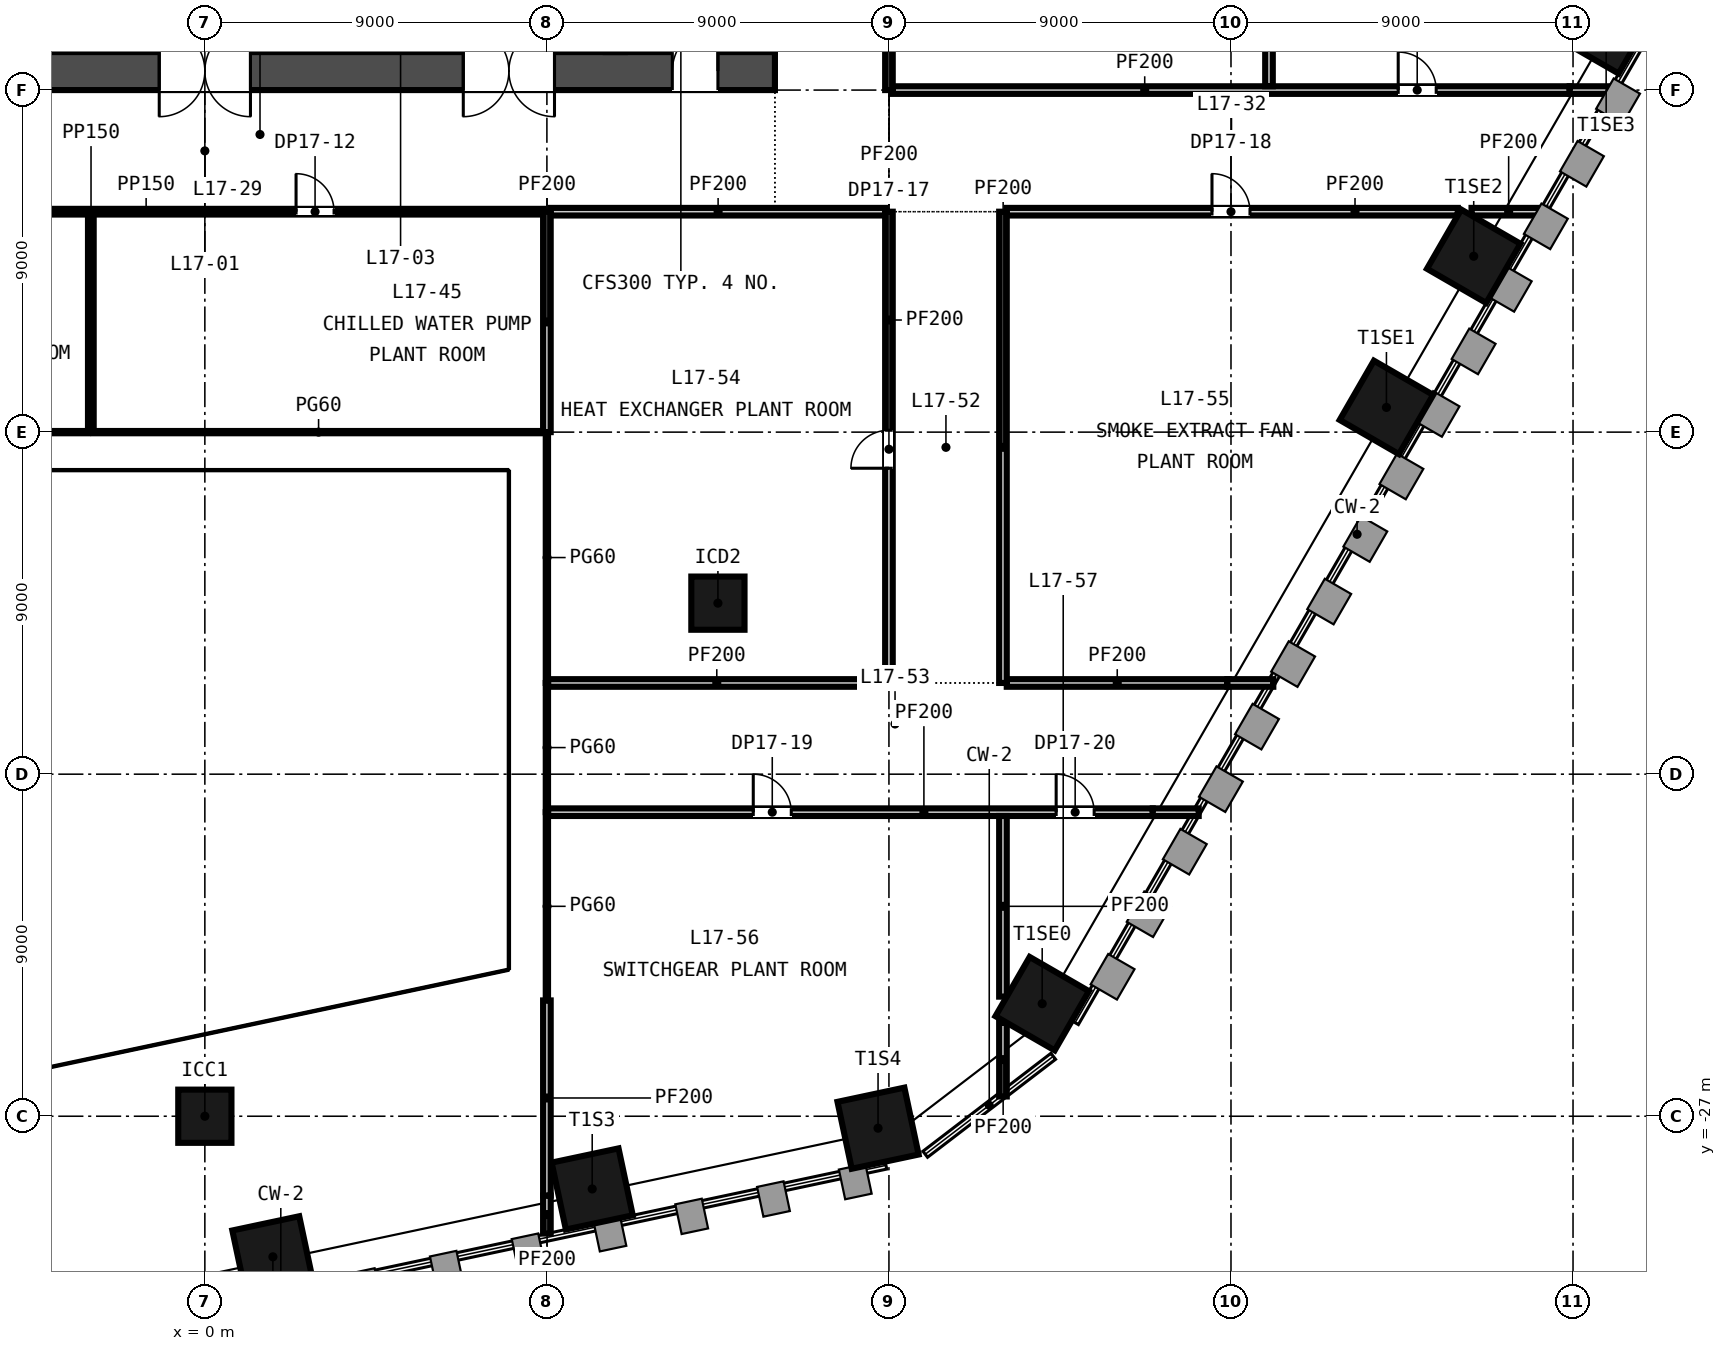
"""IFC4 building model, lengths in metres.
Left out: names, types, materials, properties, quantities, classifications, styles, units other than length and angle.
Written with IfcOpenShell. Run it as: python <this file> out.ifc"""

import sys

from ifc_helpers import new_model, si_unit, direction, frame, frame_2d, origin, origin_2d, place, context, subcontext, project, spatial, rectangle, extrude, element, fill, save


model = new_model("IFC4")
c1 = context("Model", 3, precision=1e-05, world=origin(), true_north=direction((0.0, 1.0)))
c2 = subcontext(c1, "Body", "Model", "MODEL_VIEW")
j1 = project(units=[si_unit("LENGTHUNIT", "METRE"), si_unit("PLANEANGLEUNIT", "RADIAN")], contexts=[c1])
p1 = place(None, origin())
s1 = spatial("IfcSite", under=j1, at=p1, CompositionType="ELEMENT")
p2 = place(p1, origin())
s2 = spatial("IfcBuilding", under=s1, at=p2, CompositionType="ELEMENT")
p3 = place(p2, frame((0.0, 0.0, 76.15)))
s3 = spatial("IfcBuildingStorey", under=s2, at=p3, CompositionType="ELEMENT", Elevation=76.15)
p4 = place(p3, frame((-15.0, 0.5, -0.3), z_axis=(0.0, 0.0, 1.0), x_axis=(1.0, 0.0, 0.0)))
e1 = element("IfcWall", 1, at=p4, inside=s3, PredefinedType="SOLIDWALL", context=c2, shape_type="SweptSolid", body=[
    extrude(rectangle(XDim=30.0, YDim=1.0, at=frame_2d((15.0, 0.0))), origin(), (0.0, 0.0, 1.0), 4.65),
])
p5 = place(p4, frame((5.8, 0.0, 0.3)))
e2 = element("IfcOpeningElement", 2, at=p5, cuts=e1, PredefinedType="OPENING", context=c2, shape_type="SweptSolid", body=[
    extrude(rectangle(XDim=2.4, YDim=2.4, at=frame_2d((1.2, 1.2))), frame((0.0, 0.51, 0.0), z_axis=(0.0, -1.0, 0.0), x_axis=(1.0, 0.0, 0.0)), (0.0, 0.0, 1.0), 1.02),
])
p6 = place(p4, frame((13.8, 0.0, 0.3)))
e3 = element("IfcOpeningElement", 3, at=p6, cuts=e1, PredefinedType="OPENING", context=c2, shape_type="SweptSolid", body=[
    extrude(rectangle(XDim=2.4, YDim=2.4, at=frame_2d((1.2, 1.2))), frame((0.0, 0.51, 0.0), z_axis=(0.0, -1.0, 0.0), x_axis=(1.0, 0.0, 0.0)), (0.0, 0.0, 1.0), 1.02),
])
p7 = place(p4, frame((21.8, 0.0, 0.3)))
e4 = element("IfcOpeningElement", 4, at=p7, cuts=e1, PredefinedType="OPENING", context=c2, shape_type="SweptSolid", body=[
    extrude(rectangle(XDim=2.4, YDim=2.4, at=frame_2d((1.2, 1.2))), frame((0.0, 0.51, 0.0), z_axis=(0.0, -1.0, 0.0), x_axis=(1.0, 0.0, 0.0)), (0.0, 0.0, 1.0), 1.02),
])
p8 = place(p4, frame((1.5, 0.0, 0.3)))
e5 = element("IfcOpeningElement", 5, at=p8, cuts=e1, PredefinedType="OPENING", context=c2, shape_type="SweptSolid", body=[
    extrude(rectangle(XDim=1.2, YDim=2.1, at=frame_2d((0.6, 1.05))), frame((0.0, 0.51, 0.0), z_axis=(0.0, -1.0, 0.0), x_axis=(1.0, 0.0, 0.0)), (0.0, 0.0, 1.0), 1.02),
])
p9 = place(p4, frame((27.3, 0.0, 0.3)))
e6 = element("IfcOpeningElement", 6, at=p9, cuts=e1, PredefinedType="OPENING", context=c2, shape_type="SweptSolid", body=[
    extrude(rectangle(XDim=1.2, YDim=2.1, at=frame_2d((0.6, 1.05))), frame((0.0, 0.51, 0.0), z_axis=(0.0, -1.0, 0.0), x_axis=(1.0, 0.0, 0.0)), (0.0, 0.0, 1.0), 1.02),
])
for number, where, z_axis, x_axis in (
    (7, (1.791, -30.699, -0.3), (0.0, 0.0, 1.0), (0.978, 0.208, 0.0)),
    (8, (10.192, -28.914, -0.3), (0.0, 0.0, 1.0), (0.978, 0.208, 0.0)),
    (9, (17.714, -27.315, -0.3), (0.0, 0.0, 1.0), (0.978, 0.208, 0.0)),
    (10, (22.032, -24.039, -0.3), (0.0, 0.0, 1.0), (0.5, 0.866, 0.0)),
    (11, (31.09, -8.35, -0.3), (0.0, 0.0, 1.0), (0.5, 0.866, 0.0)),
    (12, (33.387, -4.373, -0.3), (0.0, 0.0, 1.0), (0.5, 0.866, 0.0)),
    (13, (36.872, 1.663, -0.3), (0.0, 0.0, 1.0), (0.5, 0.866, 0.0)),
):
    element("IfcColumn", number, at=place(p3, frame(where, z_axis=z_axis, x_axis=x_axis)), inside=s3, PredefinedType="COLUMN", context=c2, shape_type="SweptSolid", body=[
        extrude(rectangle(XDim=1.8, YDim=1.8, at=origin_2d()), origin(), (0.0, 0.0, 1.0), 4.65),
    ])
for number, where, z_axis, x_axis in (
    (14, (0.0, -27.0, -0.3), (0.0, 0.0, 1.0), (1.0, 0.0, 0.0)),
    (15, (13.5, -13.5, -0.3), (0.0, 0.0, 1.0), (1.0, 0.0, 0.0)),
):
    element("IfcColumn", number, at=place(p3, frame(where, z_axis=z_axis, x_axis=x_axis)), inside=s3, PredefinedType="COLUMN", context=c2, shape_type="SweptSolid", body=[
        extrude(rectangle(XDim=1.4, YDim=1.4, at=origin_2d()), origin(), (0.0, 0.0, 1.0), 4.65),
    ])
p10 = place(p3, frame((9.03, -19.0, 0.0), z_axis=(0.0, 0.0, 1.0), x_axis=(1.0, 0.0, 0.0)))
e16 = element("IfcWall", 16, at=p10, inside=s3, PredefinedType="PARTITIONING", context=c2, shape_type="SweptSolid", body=[
    extrude(rectangle(XDim=15.911, YDim=0.2, at=frame_2d((7.956, 0.0))), origin(), (0.0, 0.0, 1.0), 4.35),
])
p11 = place(p10, frame((5.4, 0.0, 0.0)))
e17 = element("IfcOpeningElement", 17, at=p11, cuts=e16, PredefinedType="OPENING", context=c2, shape_type="SweptSolid", body=[
    extrude(rectangle(XDim=1.0, YDim=2.1, at=frame_2d((0.5, 1.05))), frame((0.0, 0.11, 0.0), z_axis=(0.0, -1.0, 0.0), x_axis=(1.0, 0.0, 0.0)), (0.0, 0.0, 1.0), 0.22),
])
p12 = place(p10, frame((13.37, 0.0, 0.0)))
e18 = element("IfcOpeningElement", 18, at=p12, cuts=e16, PredefinedType="OPENING", context=c2, shape_type="SweptSolid", body=[
    extrude(rectangle(XDim=1.0, YDim=2.1, at=frame_2d((0.5, 1.05))), frame((0.0, 0.11, 0.0), z_axis=(0.0, -1.0, 0.0), x_axis=(1.0, 0.0, 0.0)), (0.0, 0.0, 1.0), 0.22),
])
p13 = place(p3, frame((24.941, -19.0, 0.0), z_axis=(0.0, 0.0, 1.0), x_axis=(1.0, 0.0, 0.0)))
e19 = element("IfcWall", 19, at=p13, inside=s3, PredefinedType="PARTITIONING", context=c2, shape_type="SweptSolid", body=[
    extrude(rectangle(XDim=1.209, YDim=0.2, at=frame_2d((0.605, 0.0))), origin(), (0.0, 0.0, 1.0), 3.5),
])
p14 = place(p3, frame((9.03, -15.6, 0.0), z_axis=(0.0, 0.0, 1.0), x_axis=(1.0, 0.0, 0.0)))
e20 = element("IfcWall", 20, at=p14, inside=s3, PredefinedType="PARTITIONING", context=c2, shape_type="SweptSolid", body=[
    extrude(rectangle(XDim=8.87, YDim=0.2, at=frame_2d((4.435, 0.0))), origin(), (0.0, 0.0, 1.0), 4.35),
])
p15 = place(p3, frame((21.1, -15.6, 0.0), z_axis=(0.0, 0.0, 1.0), x_axis=(1.0, 0.0, 0.0)))
e21 = element("IfcWall", 21, at=p15, inside=s3, PredefinedType="PARTITIONING", context=c2, shape_type="SweptSolid", body=[
    extrude(rectangle(XDim=5.804, YDim=0.2, at=frame_2d((2.902, 0.0))), origin(), (0.0, 0.0, 1.0), 4.35),
])
p16 = place(p3, frame((26.905, -15.6, 0.0), z_axis=(0.0, 0.0, 1.0), x_axis=(1.0, 0.0, 0.0)))
e22 = element("IfcWall", 22, at=p16, inside=s3, PredefinedType="PARTITIONING", context=c2, shape_type="SweptSolid", body=[
    extrude(rectangle(XDim=1.209, YDim=0.2, at=frame_2d((0.604, 0.0))), origin(), (0.0, 0.0, 1.0), 3.5),
])
p17 = place(p3, frame((-8.9, -9.0, 0.0), z_axis=(0.0, 0.0, 1.0), x_axis=(1.0, 0.0, 0.0)))
e23 = element("IfcWall", 23, at=p17, inside=s3, PredefinedType="PARTITIONING", context=c2, shape_type="SweptSolid", body=[
    extrude(rectangle(XDim=5.825, YDim=0.06, at=frame_2d((2.913, 0.0))), origin(), (0.0, 0.0, 1.0), 4.35),
])
p18 = place(p3, frame((-2.925, -9.0, 0.0), z_axis=(0.0, 0.0, 1.0), x_axis=(1.0, 0.0, 0.0)))
e24 = element("IfcWall", 24, at=p18, inside=s3, PredefinedType="PARTITIONING", context=c2, shape_type="SweptSolid", body=[
    extrude(rectangle(XDim=11.825, YDim=0.06, at=frame_2d((5.913, 0.0))), origin(), (0.0, 0.0, 1.0), 4.35),
])
p19 = place(p3, frame((-8.9, -3.2, 0.0), z_axis=(0.0, 0.0, 1.0), x_axis=(1.0, 0.0, 0.0)))
e25 = element("IfcWall", 25, at=p19, inside=s3, PredefinedType="PARTITIONING", context=c2, shape_type="SweptSolid", body=[
    extrude(rectangle(XDim=17.8, YDim=0.15, at=frame_2d((8.9, 0.0))), origin(), (0.0, 0.0, 1.0), 4.35),
])
p20 = place(p19, frame((2.4, 0.0, 0.0)))
e26 = element("IfcOpeningElement", 26, at=p20, cuts=e25, PredefinedType="OPENING", context=c2, shape_type="SweptSolid", body=[
    extrude(rectangle(XDim=1.0, YDim=2.1, at=frame_2d((0.5, 1.05))), frame((0.0, 0.085, 0.0), z_axis=(0.0, -1.0, 0.0), x_axis=(1.0, 0.0, 0.0)), (0.0, 0.0, 1.0), 0.17),
])
p21 = place(p19, frame((11.3, 0.0, 0.0)))
e27 = element("IfcOpeningElement", 27, at=p21, cuts=e25, PredefinedType="OPENING", context=c2, shape_type="SweptSolid", body=[
    extrude(rectangle(XDim=1.0, YDim=2.1, at=frame_2d((0.5, 1.05))), frame((0.0, 0.085, 0.0), z_axis=(0.0, -1.0, 0.0), x_axis=(1.0, 0.0, 0.0)), (0.0, 0.0, 1.0), 0.17),
])
p22 = place(p3, frame((9.1, -3.2, 0.0), z_axis=(0.0, 0.0, 1.0), x_axis=(1.0, 0.0, 0.0)))
e28 = element("IfcWall", 28, at=p22, inside=s3, PredefinedType="PARTITIONING", context=c2, shape_type="SweptSolid", body=[
    extrude(rectangle(XDim=8.8, YDim=0.2, at=frame_2d((4.4, 0.0))), origin(), (0.0, 0.0, 1.0), 4.35),
])
p23 = place(p3, frame((21.1, -3.2, 0.0), z_axis=(0.0, 0.0, 1.0), x_axis=(1.0, 0.0, 0.0)))
e29 = element("IfcWall", 29, at=p23, inside=s3, PredefinedType="PARTITIONING", context=c2, shape_type="SweptSolid", body=[
    extrude(rectangle(XDim=11.867, YDim=0.2, at=frame_2d((5.933, 0.0))), origin(), (0.0, 0.0, 1.0), 4.35),
])
p24 = place(p23, frame((5.4, 0.0, 0.0)))
e30 = element("IfcOpeningElement", 30, at=p24, cuts=e29, PredefinedType="OPENING", context=c2, shape_type="SweptSolid", body=[
    extrude(rectangle(XDim=1.0, YDim=2.1, at=frame_2d((0.5, 1.05))), frame((0.0, 0.11, 0.0), z_axis=(0.0, -1.0, 0.0), x_axis=(1.0, 0.0, 0.0)), (0.0, 0.0, 1.0), 0.22),
])
p25 = place(p3, frame((33.329, -3.2, 0.0), z_axis=(0.0, 0.0, 1.0), x_axis=(1.0, 0.0, 0.0)))
e31 = element("IfcWall", 31, at=p25, inside=s3, PredefinedType="PARTITIONING", context=c2, shape_type="SweptSolid", body=[
    extrude(rectangle(XDim=1.944, YDim=0.2, at=frame_2d((0.972, 0.0))), origin(), (0.0, 0.0, 1.0), 3.5),
])
p26 = place(p3, frame((18.1, 0.0, 0.0), z_axis=(0.0, 0.0, 1.0), x_axis=(1.0, 0.0, 0.0)))
e32 = element("IfcWall", 32, at=p26, inside=s3, PredefinedType="PARTITIONING", context=c2, shape_type="SweptSolid", body=[
    extrude(rectangle(XDim=17.811, YDim=0.2, at=frame_2d((8.906, 0.0))), origin(), (0.0, 0.0, 1.0), 4.35),
])
p27 = place(p26, frame((13.3, 0.0, 0.0)))
e33 = element("IfcOpeningElement", 33, at=p27, cuts=e32, PredefinedType="OPENING", context=c2, shape_type="SweptSolid", body=[
    extrude(rectangle(XDim=1.0, YDim=2.1, at=frame_2d((0.5, 1.05))), frame((0.0, 0.11, 0.0), z_axis=(0.0, -1.0, 0.0), x_axis=(1.0, 0.0, 0.0)), (0.0, 0.0, 1.0), 0.22),
])
p28 = place(p3, frame((35.911, 0.0, 0.0), z_axis=(0.0, 0.0, 1.0), x_axis=(1.0, 0.0, 0.0)))
e34 = element("IfcWall", 34, at=p28, inside=s3, PredefinedType="PARTITIONING", context=c2, shape_type="SweptSolid", body=[
    extrude(rectangle(XDim=1.209, YDim=0.2, at=frame_2d((0.604, 0.0))), origin(), (0.0, 0.0, 1.0), 3.5),
])
p29 = place(p3, frame((-3.0, -9.0, 0.0), z_axis=(0.0, 0.0, 1.0), x_axis=(0.0, 1.0, 0.0)))
e35 = element("IfcWall", 35, at=p29, inside=s3, PredefinedType="PARTITIONING", context=c2, shape_type="SweptSolid", body=[
    extrude(rectangle(XDim=5.725, YDim=0.15, at=frame_2d((2.863, 0.0))), origin(), (0.0, 0.0, 1.0), 4.35),
])
p30 = place(p3, frame((9.0, -30.087, 0.0), z_axis=(0.0, 0.0, 1.0), x_axis=(0.0, 1.0, 0.0)))
e36 = element("IfcWall", 36, at=p30, inside=s3, PredefinedType="PARTITIONING", context=c2, shape_type="SweptSolid", body=[
    extrude(rectangle(XDim=1.0, YDim=0.2, at=frame_2d((0.5, 0.0))), origin(), (0.0, 0.0, 1.0), 3.5),
])
p31 = place(p3, frame((9.0, -29.087, 0.0), z_axis=(0.0, 0.0, 1.0), x_axis=(0.0, 1.0, 0.0)))
e37 = element("IfcWall", 37, at=p31, inside=s3, PredefinedType="PARTITIONING", context=c2, shape_type="SweptSolid", body=[
    extrude(rectangle(XDim=5.134, YDim=0.2, at=frame_2d((2.567, 0.0))), origin(), (0.0, 0.0, 1.0), 4.35),
])
p32 = place(p3, frame((9.0, -23.953, 0.0), z_axis=(0.0, 0.0, 1.0), x_axis=(0.0, 1.0, 0.0)))
e38 = element("IfcWall", 38, at=p32, inside=s3, PredefinedType="PARTITIONING", context=c2, shape_type="SweptSolid", body=[
    extrude(rectangle(XDim=4.952, YDim=0.06, at=frame_2d((2.476, 0.0))), origin(), (0.0, 0.0, 1.0), 4.35),
])
p33 = place(p3, frame((9.0, -18.999, 0.0), z_axis=(0.0, 0.0, 1.0), x_axis=(0.0, 1.0, 0.0)))
e39 = element("IfcWall", 39, at=p33, inside=s3, PredefinedType="PARTITIONING", context=c2, shape_type="SweptSolid", body=[
    extrude(rectangle(XDim=3.398, YDim=0.06, at=frame_2d((1.699, 0.0))), origin(), (0.0, 0.0, 1.0), 4.35),
])
p34 = place(p3, frame((9.0, -15.599, 0.0), z_axis=(0.0, 0.0, 1.0), x_axis=(0.0, 1.0, 0.0)))
e40 = element("IfcWall", 40, at=p34, inside=s3, PredefinedType="PARTITIONING", context=c2, shape_type="SweptSolid", body=[
    extrude(rectangle(XDim=6.598, YDim=0.06, at=frame_2d((3.299, 0.0))), origin(), (0.0, 0.0, 1.0), 4.35),
])
p35 = place(p3, frame((9.0, -9.0, 0.0), z_axis=(0.0, 0.0, 1.0), x_axis=(0.0, 1.0, 0.0)))
e41 = element("IfcWall", 41, at=p35, inside=s3, PredefinedType="PARTITIONING", context=c2, shape_type="SweptSolid", body=[
    extrude(rectangle(XDim=5.8, YDim=0.2, at=frame_2d((2.9, 0.0))), origin(), (0.0, 0.0, 1.0), 4.35),
])
p36 = place(p3, frame((18.0, -15.6, 0.0), z_axis=(0.0, 0.0, 1.0), x_axis=(0.0, 1.0, 0.0)))
e42 = element("IfcWall", 42, at=p36, inside=s3, PredefinedType="PARTITIONING", context=c2, shape_type="SweptSolid", body=[
    extrude(rectangle(XDim=12.4, YDim=0.2, at=frame_2d((6.2, 0.0))), origin(), (0.0, 0.0, 1.0), 4.35),
])
p37 = place(p36, frame((5.65, 0.0, 0.0)))
e43 = element("IfcOpeningElement", 43, at=p37, cuts=e42, PredefinedType="OPENING", context=c2, shape_type="SweptSolid", body=[
    extrude(rectangle(XDim=1.0, YDim=2.1, at=frame_2d((0.5, 1.05))), frame((0.0, 0.11, 0.0), z_axis=(0.0, -1.0, 0.0), x_axis=(1.0, 0.0, 0.0)), (0.0, 0.0, 1.0), 0.22),
])
p38 = place(p3, frame((18.0, 0.0, 0.0), z_axis=(0.0, 0.0, 1.0), x_axis=(0.0, 1.0, 0.0)))
e44 = element("IfcWall", 44, at=p38, inside=s3, PredefinedType="PARTITIONING", context=c2, shape_type="SweptSolid", body=[
    extrude(rectangle(XDim=14.2, YDim=0.2, at=frame_2d((7.1, 0.0))), origin(), (0.0, 0.0, 1.0), 4.35),
])
p39 = place(p38, frame((6.65, 0.0, 0.0)))
e45 = element("IfcOpeningElement", 45, at=p39, cuts=e44, PredefinedType="OPENING", context=c2, shape_type="SweptSolid", body=[
    extrude(rectangle(XDim=1.0, YDim=2.1, at=frame_2d((0.5, 1.05))), frame((0.0, 0.11, 0.0), z_axis=(0.0, -1.0, 0.0), x_axis=(1.0, 0.0, 0.0)), (0.0, 0.0, 1.0), 0.22),
])
p40 = place(p3, frame((21.0, -26.48, 0.0), z_axis=(0.0, 0.0, 1.0), x_axis=(0.0, 1.0, 0.0)))
e46 = element("IfcWall", 46, at=p40, inside=s3, PredefinedType="PARTITIONING", context=c2, shape_type="SweptSolid", body=[
    extrude(rectangle(XDim=1.94, YDim=0.2, at=frame_2d((0.97, 0.0))), origin(), (0.0, 0.0, 1.0), 3.5),
])
p41 = place(p3, frame((21.0, -23.854, 0.0), z_axis=(0.0, 0.0, 1.0), x_axis=(0.0, 1.0, 0.0)))
e47 = element("IfcWall", 47, at=p41, inside=s3, PredefinedType="PARTITIONING", context=c2, shape_type="SweptSolid", body=[
    extrude(rectangle(XDim=4.754, YDim=0.2, at=frame_2d((2.377, 0.0))), origin(), (0.0, 0.0, 1.0), 4.35),
])
p42 = place(p3, frame((21.0, -15.6, 0.0), z_axis=(0.0, 0.0, 1.0), x_axis=(0.0, 1.0, 0.0)))
e48 = element("IfcWall", 48, at=p42, inside=s3, PredefinedType="PARTITIONING", context=c2, shape_type="SweptSolid", body=[
    extrude(rectangle(XDim=12.4, YDim=0.2, at=frame_2d((6.2, 0.0))), origin(), (0.0, 0.0, 1.0), 4.35),
])
p43 = place(p3, frame((28.0, 0.1, 0.0), z_axis=(0.0, 0.0, 1.0), x_axis=(0.0, 1.0, 0.0)))
e49 = element("IfcWall", 49, at=p43, inside=s3, PredefinedType="PARTITIONING", context=c2, shape_type="SweptSolid", body=[
    extrude(rectangle(XDim=14.0, YDim=0.2, at=frame_2d((7.0, 0.0))), origin(), (0.0, 0.0, 1.0), 4.35),
])
p44 = place(p6, origin())
e50 = element("IfcDoor", 50, at=p44, inside=s3, OperationType="DOUBLE_DOOR_DOUBLE_SWING", PredefinedType="DOOR", context=c2, shape_type="SweptSolid", body=[
    extrude(rectangle(XDim=2.4, YDim=2.4, at=frame_2d((1.2, 1.2))), frame((0.0, 0.025, 0.0), z_axis=(0.0, -1.0, 0.0), x_axis=(1.0, 0.0, 0.0)), (0.0, 0.0, 1.0), 0.05),
])
fill(e3, e50)
p45 = place(p7, origin())
e51 = element("IfcDoor", 51, at=p45, inside=s3, OperationType="DOUBLE_DOOR_DOUBLE_SWING", PredefinedType="DOOR", context=c2, shape_type="SweptSolid", body=[
    extrude(rectangle(XDim=2.4, YDim=2.4, at=frame_2d((1.2, 1.2))), frame((0.0, 0.025, 0.0), z_axis=(0.0, -1.0, 0.0), x_axis=(1.0, 0.0, 0.0)), (0.0, 0.0, 1.0), 0.05),
])
fill(e4, e51)
p46 = place(p9, origin())
e52 = element("IfcDoor", 52, at=p46, inside=s3, OperationType="SINGLE_SWING_RIGHT", PredefinedType="DOOR", context=c2, shape_type="SweptSolid", body=[
    extrude(rectangle(XDim=1.2, YDim=2.1, at=frame_2d((0.6, 1.05))), frame((0.0, 0.025, 0.0), z_axis=(0.0, -1.0, 0.0), x_axis=(1.0, 0.0, 0.0)), (0.0, 0.0, 1.0), 0.05),
])
fill(e6, e52)
p47 = place(p27, origin())
e53 = element("IfcDoor", 53, at=p47, inside=s3, OperationType="SINGLE_SWING_LEFT", PredefinedType="DOOR", context=c2, shape_type="SweptSolid", body=[
    extrude(rectangle(XDim=1.0, YDim=2.1, at=frame_2d((0.5, 1.05))), frame((0.0, 0.025, 0.0), z_axis=(0.0, -1.0, 0.0), x_axis=(1.0, 0.0, 0.0)), (0.0, 0.0, 1.0), 0.05),
])
fill(e33, e53)
p48 = place(p21, origin())
e54 = element("IfcDoor", 54, at=p48, inside=s3, OperationType="SINGLE_SWING_LEFT", PredefinedType="DOOR", context=c2, shape_type="SweptSolid", body=[
    extrude(rectangle(XDim=1.0, YDim=2.1, at=frame_2d((0.5, 1.05))), frame((0.0, 0.025, 0.0), z_axis=(0.0, -1.0, 0.0), x_axis=(1.0, 0.0, 0.0)), (0.0, 0.0, 1.0), 0.05),
])
fill(e27, e54)
p49 = place(p37, origin())
e55 = element("IfcDoor", 55, at=p49, inside=s3, OperationType="SINGLE_SWING_LEFT", PredefinedType="DOOR", context=c2, shape_type="SweptSolid", body=[
    extrude(rectangle(XDim=1.0, YDim=2.1, at=frame_2d((0.5, 1.05))), frame((0.0, 0.025, 0.0), z_axis=(0.0, -1.0, 0.0), x_axis=(1.0, 0.0, 0.0)), (0.0, 0.0, 1.0), 0.05),
])
fill(e43, e55)
p50 = place(p24, origin())
e56 = element("IfcDoor", 56, at=p50, inside=s3, OperationType="SINGLE_SWING_LEFT", PredefinedType="DOOR", context=c2, shape_type="SweptSolid", body=[
    extrude(rectangle(XDim=1.0, YDim=2.1, at=frame_2d((0.5, 1.05))), frame((0.0, 0.025, 0.0), z_axis=(0.0, -1.0, 0.0), x_axis=(1.0, 0.0, 0.0)), (0.0, 0.0, 1.0), 0.05),
])
fill(e30, e56)
p51 = place(p11, origin())
e57 = element("IfcDoor", 57, at=p51, inside=s3, OperationType="SINGLE_SWING_LEFT", PredefinedType="DOOR", context=c2, shape_type="SweptSolid", body=[
    extrude(rectangle(XDim=1.0, YDim=2.1, at=frame_2d((0.5, 1.05))), frame((0.0, 0.025, 0.0), z_axis=(0.0, -1.0, 0.0), x_axis=(1.0, 0.0, 0.0)), (0.0, 0.0, 1.0), 0.05),
])
fill(e17, e57)
p52 = place(p12, origin())
e58 = element("IfcDoor", 58, at=p52, inside=s3, OperationType="SINGLE_SWING_LEFT", PredefinedType="DOOR", context=c2, shape_type="SweptSolid", body=[
    extrude(rectangle(XDim=1.0, YDim=2.1, at=frame_2d((0.5, 1.05))), frame((0.0, 0.025, 0.0), z_axis=(0.0, -1.0, 0.0), x_axis=(1.0, 0.0, 0.0)), (0.0, 0.0, 1.0), 0.05),
])
fill(e18, e58)
save(model, sys.argv[1])
